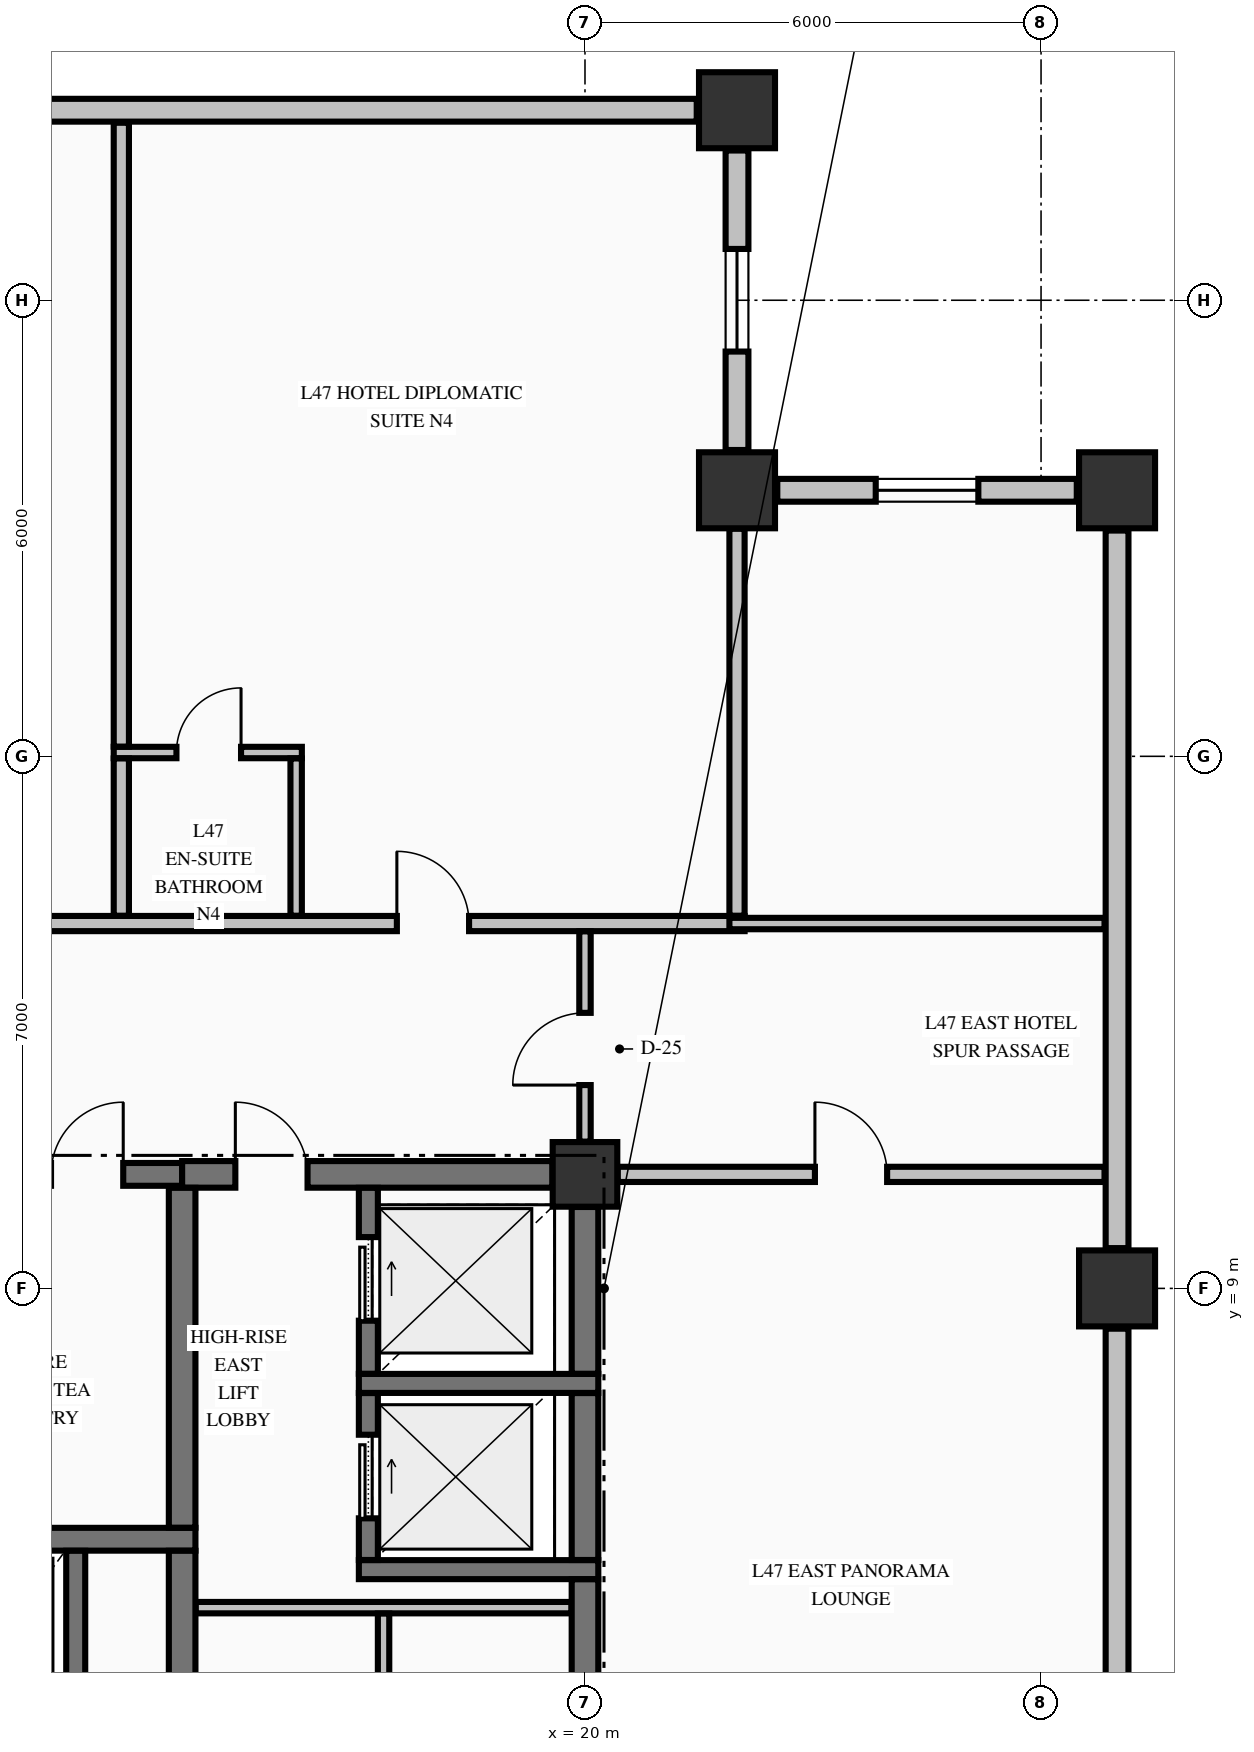
"""IFC4 building model, lengths in metres.
Left out: names, types, materials, properties, quantities, classifications, styles, units other than length and angle.
Written with IfcOpenShell. Run it as: python <this file> out.ifc"""

import sys

from ifc_helpers import new_model, si_unit, direction, frame, frame_2d, origin, origin_2d, place, context, subcontext, project, spatial, rectangle, extrude, element, fill, save


model = new_model("IFC4")
c1 = context("Model", 3, precision=1e-05, world=origin(), true_north=direction((0.0, 1.0)))
c2 = subcontext(c1, "Body", "Model", "MODEL_VIEW")
j1 = project(units=[si_unit("LENGTHUNIT", "METRE"), si_unit("PLANEANGLEUNIT", "RADIAN")], contexts=[c1])
p1 = place(None, origin())
s1 = spatial("IfcSite", under=j1, at=p1, CompositionType="ELEMENT")
p2 = place(p1, origin())
s2 = spatial("IfcBuilding", under=s1, at=p2, CompositionType="ELEMENT")
p3 = place(p2, frame((0.0, 0.0, 183.06)))
s3 = spatial("IfcBuildingStorey", under=s2, at=p3, CompositionType="ELEMENT", Elevation=183.06)
for number, where, z_axis, x_axis in (
    (1, (22.0, 24.5, -0.25), (0.0, 0.0, 1.0), (1.0, 0.0, 0.0)),
    (2, (27.0, 9.0, -0.25), (0.0, 0.0, 1.0), (1.0, 0.0, 0.0)),
    (3, (27.0, 19.5, -0.25), (0.0, 0.0, 1.0), (1.0, 0.0, 0.0)),
    (4, (22.0, 19.5, -0.25), (0.0, 0.0, 1.0), (1.0, 0.0, 0.0)),
):
    element("IfcColumn", number, at=place(p3, frame(where, z_axis=z_axis, x_axis=x_axis)), inside=s3, PredefinedType="COLUMN", context=c2, shape_type="SweptSolid", body=[
        extrude(rectangle(XDim=1.0, YDim=1.0, at=origin_2d()), origin(), (0.0, 0.0, 1.0), 3.225),
    ])
p4 = place(p3, frame((20.0, 10.5, -0.25), z_axis=(0.0, 0.0, 1.0), x_axis=(1.0, 0.0, 0.0)))
e5 = element("IfcColumn", 5, at=p4, inside=s3, PredefinedType="COLUMN", context=c2, shape_type="SweptSolid", body=[
    extrude(rectangle(XDim=0.85, YDim=0.85, at=origin_2d()), origin(), (0.0, 0.0, 1.0), 3.225),
])
p5 = place(p3, frame((26.47, 19.5, 0.0), z_axis=(0.0, 0.0, 1.0), x_axis=(-1.0, 0.0, 0.0)))
e6 = element("IfcWall", 6, at=p5, inside=s3, PredefinedType="STANDARD", context=c2, shape_type="SweptSolid", body=[
    extrude(rectangle(XDim=3.94, YDim=0.3, at=frame_2d((1.97, 0.0))), origin(), (0.0, 0.0, 1.0), 2.367),
])
p6 = place(p5, frame((1.295, 0.0, 0.68)))
e7 = element("IfcOpeningElement", 7, at=p6, cuts=e6, PredefinedType="OPENING", context=c2, shape_type="SweptSolid", body=[
    extrude(rectangle(XDim=1.35, YDim=1.42, at=frame_2d((0.675, 0.71))), frame((0.0, 0.16, 0.0), z_axis=(0.0, -1.0, 0.0), x_axis=(1.0, 0.0, 0.0)), (0.0, 0.0, 1.0), 0.32),
])
p7 = place(p3, frame((22.0, 20.03, 0.0), z_axis=(0.0, 0.0, 1.0), x_axis=(0.0, 1.0, 0.0)))
e8 = element("IfcWall", 8, at=p7, inside=s3, PredefinedType="STANDARD", context=c2, shape_type="SweptSolid", body=[
    extrude(rectangle(XDim=3.94, YDim=0.3, at=frame_2d((1.97, 0.0))), origin(), (0.0, 0.0, 1.0), 2.367),
])
p8 = place(p7, frame((1.295, 0.0, 0.68)))
e9 = element("IfcOpeningElement", 9, at=p8, cuts=e8, PredefinedType="OPENING", context=c2, shape_type="SweptSolid", body=[
    extrude(rectangle(XDim=1.35, YDim=1.42, at=frame_2d((0.675, 0.71))), frame((0.0, 0.16, 0.0), z_axis=(0.0, -1.0, 0.0), x_axis=(1.0, 0.0, 0.0)), (0.0, 0.0, 1.0), 0.32),
])
p9 = place(p3, frame((21.47, 24.5, 0.0), z_axis=(0.0, 0.0, 1.0), x_axis=(-1.0, 0.0, 0.0)))
e10 = element("IfcWall", 10, at=p9, inside=s3, PredefinedType="STANDARD", context=c2, shape_type="SweptSolid", body=[
    extrude(rectangle(XDim=9.94, YDim=0.3, at=frame_2d((4.97, 0.0))), origin(), (0.0, 0.0, 1.0), 2.367),
])
p10 = place(p3, frame((27.0, 0.53, 0.0), z_axis=(0.0, 0.0, 1.0), x_axis=(0.0, 1.0, 0.0)))
e11 = element("IfcWall", 11, at=p10, inside=s3, PredefinedType="STANDARD", context=c2, shape_type="SweptSolid", body=[
    extrude(rectangle(XDim=7.94, YDim=0.3, at=frame_2d((3.97, 0.0))), origin(), (0.0, 0.0, 1.0), 2.367),
])
p11 = place(p3, frame((27.0, 9.53, 0.0), z_axis=(0.0, 0.0, 1.0), x_axis=(0.0, 1.0, 0.0)))
e12 = element("IfcWall", 12, at=p11, inside=s3, PredefinedType="STANDARD", context=c2, shape_type="SweptSolid", body=[
    extrude(rectangle(XDim=9.44, YDim=0.3, at=frame_2d((4.72, 0.0))), origin(), (0.0, 0.0, 1.0), 2.367),
])
p12 = place(p3, frame((17.025, 5.3, 0.0), z_axis=(0.0, 0.0, 1.0), x_axis=(1.0, 0.0, 0.0)))
e13 = element("IfcWall", 13, at=p12, inside=s3, PredefinedType="SOLIDWALL", context=c2, shape_type="SweptSolid", body=[
    extrude(rectangle(XDim=3.15, YDim=0.25, at=frame_2d((1.575, 0.0))), origin(), (0.0, 0.0, 1.0), 2.975),
])
p13 = place(p3, frame((10.85, 5.7, 0.0), z_axis=(0.0, 0.0, 1.0), x_axis=(1.0, 0.0, 0.0)))
e14 = element("IfcWall", 14, at=p13, inside=s3, PredefinedType="SHEAR", context=c2, shape_type="SweptSolid", body=[
    extrude(rectangle(XDim=4.025, YDim=0.3, at=frame_2d((2.012, 0.0))), origin(), (0.0, 0.0, 1.0), 2.975),
])
p14 = place(p3, frame((17.025, 7.75, 0.0), z_axis=(0.0, 0.0, 1.0), x_axis=(1.0, 0.0, 0.0)))
e15 = element("IfcWall", 15, at=p14, inside=s3, PredefinedType="SOLIDWALL", context=c2, shape_type="SweptSolid", body=[
    extrude(rectangle(XDim=3.15, YDim=0.25, at=frame_2d((1.575, 0.0))), origin(), (0.0, 0.0, 1.0), 2.975),
])
p15 = place(p3, frame((11.429, 10.5, 0.0), z_axis=(0.0, 0.0, 1.0), x_axis=(1.0, 0.0, 0.0)))
e16 = element("IfcWall", 16, at=p15, inside=s3, PredefinedType="SHEAR", context=c2, shape_type="SweptSolid", body=[
    extrude(rectangle(XDim=3.271, YDim=0.3, at=frame_2d((1.635, 0.0))), origin(), (0.0, 0.0, 1.0), 2.975),
])
p16 = place(p15, frame((1.546, 0.0, 0.0)))
e17 = element("IfcOpeningElement", 17, at=p16, cuts=e16, PredefinedType="OPENING", context=c2, shape_type="SweptSolid", body=[
    extrude(rectangle(XDim=0.95, YDim=2.02, at=frame_2d((0.475, 1.01))), frame((0.0, 0.16, 0.0), z_axis=(0.0, -1.0, 0.0), x_axis=(1.0, 0.0, 0.0)), (0.0, 0.0, 1.0), 0.32),
])
p17 = place(p3, frame((14.7, 10.5, 0.0), z_axis=(0.0, 0.0, 1.0), x_axis=(1.0, 0.0, 0.0)))
e18 = element("IfcWall", 18, at=p17, inside=s3, PredefinedType="SHEAR", context=c2, shape_type="SweptSolid", body=[
    extrude(rectangle(XDim=4.871, YDim=0.35, at=frame_2d((2.436, 0.0))), origin(), (0.0, 0.0, 1.0), 2.975),
])
p18 = place(p17, frame((0.7, 0.0, 0.0)))
e19 = element("IfcOpeningElement", 19, at=p18, cuts=e18, PredefinedType="OPENING", context=c2, shape_type="SweptSolid", body=[
    extrude(rectangle(XDim=0.95, YDim=2.02, at=frame_2d((0.475, 1.01))), frame((0.0, 0.185, 0.0), z_axis=(0.0, -1.0, 0.0), x_axis=(1.0, 0.0, 0.0)), (0.0, 0.0, 1.0), 0.37),
])
p19 = place(p3, frame((14.878, 4.8, 0.0), z_axis=(0.0, 0.0, 1.0), x_axis=(1.0, 0.0, 0.0)))
e20 = element("IfcWall", 20, at=p19, inside=s3, PredefinedType="PARTITIONING", context=c2, shape_type="SweptSolid", body=[
    extrude(rectangle(XDim=4.944, YDim=0.15, at=frame_2d((2.472, 0.0))), origin(), (0.0, 0.0, 1.0), 2.975),
])
p20 = place(p3, frame((20.431, 10.5, 0.0), z_axis=(0.0, 0.0, 1.0), x_axis=(1.0, 0.0, 0.0)))
e21 = element("IfcWall", 21, at=p20, inside=s3, PredefinedType="PARTITIONING", context=c2, shape_type="SweptSolid", body=[
    extrude(rectangle(XDim=6.404, YDim=0.2, at=frame_2d((3.202, 0.0))), origin(), (0.0, 0.0, 1.0), 2.975),
])
p21 = place(p20, frame((2.594, 0.0, 0.0)))
e22 = element("IfcOpeningElement", 22, at=p21, cuts=e21, PredefinedType="OPENING", context=c2, shape_type="SweptSolid", body=[
    extrude(rectangle(XDim=0.95, YDim=2.15, at=frame_2d((0.475, 1.075))), frame((0.0, 0.11, 0.0), z_axis=(0.0, -1.0, 0.0), x_axis=(1.0, 0.0, 0.0)), (0.0, 0.0, 1.0), 0.22),
])
p22 = place(p3, frame((-17.1, 13.8, 0.0), z_axis=(0.0, 0.0, 1.0), x_axis=(1.0, 0.0, 0.0)))
e23 = element("IfcWall", 23, at=p22, inside=s3, PredefinedType="PARTITIONING", context=c2, shape_type="SweptSolid", body=[
    extrude(rectangle(XDim=39.2, YDim=0.2, at=frame_2d((19.6, 0.0))), origin(), (0.0, 0.0, 1.0), 2.975),
])
p23 = place(p22, frame((7.475, 0.0, 0.0)))
e24 = element("IfcOpeningElement", 24, at=p23, cuts=e23, PredefinedType="OPENING", context=c2, shape_type="SweptSolid", body=[
    extrude(rectangle(XDim=0.95, YDim=2.15, at=frame_2d((0.475, 1.075))), frame((0.0, 0.11, 0.0), z_axis=(0.0, -1.0, 0.0), x_axis=(1.0, 0.0, 0.0)), (0.0, 0.0, 1.0), 0.22),
])
p24 = place(p22, frame((14.625, 0.0, 0.0)))
e25 = element("IfcOpeningElement", 25, at=p24, cuts=e23, PredefinedType="OPENING", context=c2, shape_type="SweptSolid", body=[
    extrude(rectangle(XDim=1.05, YDim=2.15, at=frame_2d((0.525, 1.075))), frame((0.0, 0.11, 0.0), z_axis=(0.0, -1.0, 0.0), x_axis=(1.0, 0.0, 0.0)), (0.0, 0.0, 1.0), 0.22),
])
p25 = place(p22, frame((28.875, 0.0, 0.0)))
e26 = element("IfcOpeningElement", 26, at=p25, cuts=e23, PredefinedType="OPENING", context=c2, shape_type="SweptSolid", body=[
    extrude(rectangle(XDim=0.95, YDim=2.15, at=frame_2d((0.475, 1.075))), frame((0.0, 0.11, 0.0), z_axis=(0.0, -1.0, 0.0), x_axis=(1.0, 0.0, 0.0)), (0.0, 0.0, 1.0), 0.22),
])
p26 = place(p22, frame((34.625, 0.0, 0.0)))
e27 = element("IfcOpeningElement", 27, at=p26, cuts=e23, PredefinedType="OPENING", context=c2, shape_type="SweptSolid", body=[
    extrude(rectangle(XDim=0.95, YDim=2.15, at=frame_2d((0.475, 1.075))), frame((0.0, 0.11, 0.0), z_axis=(0.0, -1.0, 0.0), x_axis=(1.0, 0.0, 0.0)), (0.0, 0.0, 1.0), 0.22),
])
p27 = place(p3, frame((21.9, 13.8, 0.0), z_axis=(0.0, 0.0, 1.0), x_axis=(1.0, 0.0, 0.0)))
e28 = element("IfcWall", 28, at=p27, inside=s3, PredefinedType="PARTITIONING", context=c2, shape_type="SweptSolid", body=[
    extrude(rectangle(XDim=4.935, YDim=0.15, at=frame_2d((2.468, 0.0))), origin(), (0.0, 0.0, 1.0), 2.975),
])
p28 = place(p3, frame((13.8, 16.05, 0.0), z_axis=(0.0, 0.0, 1.0), x_axis=(1.0, 0.0, 0.0)))
e29 = element("IfcWall", 29, at=p28, inside=s3, PredefinedType="PARTITIONING", context=c2, shape_type="SweptSolid", body=[
    extrude(rectangle(XDim=2.475, YDim=0.15, at=frame_2d((1.237, 0.0))), origin(), (0.0, 0.0, 1.0), 2.975),
])
p29 = place(p28, frame((0.825, 0.0, 0.0)))
e30 = element("IfcOpeningElement", 30, at=p29, cuts=e29, PredefinedType="OPENING", context=c2, shape_type="SweptSolid", body=[
    extrude(rectangle(XDim=0.85, YDim=2.1, at=frame_2d((0.425, 1.05))), frame((0.0, 0.085, 0.0), z_axis=(0.0, -1.0, 0.0), x_axis=(1.0, 0.0, 0.0)), (0.0, 0.0, 1.0), 0.17),
])
p30 = place(p3, frame((13.3, 3.052, 0.0), z_axis=(0.0, 0.0, 1.0), x_axis=(0.0, 1.0, 0.0)))
e31 = element("IfcWall", 31, at=p30, inside=s3, PredefinedType="SOLIDWALL", context=c2, shape_type="SweptSolid", body=[
    extrude(rectangle(XDim=2.496, YDim=0.25, at=frame_2d((1.248, 0.0))), origin(), (0.0, 0.0, 1.0), 2.975),
])
p31 = place(p3, frame((14.7, 3.052, 0.0), z_axis=(0.0, 0.0, 1.0), x_axis=(0.0, 1.0, 0.0)))
e32 = element("IfcWall", 32, at=p31, inside=s3, PredefinedType="SHEAR", context=c2, shape_type="SweptSolid", body=[
    extrude(rectangle(XDim=2.496, YDim=0.35, at=frame_2d((1.248, 0.0))), origin(), (0.0, 0.0, 1.0), 2.975),
])
p32 = place(p3, frame((14.7, 5.852, 0.0), z_axis=(0.0, 0.0, 1.0), x_axis=(0.0, 1.0, 0.0)))
e33 = element("IfcWall", 33, at=p32, inside=s3, PredefinedType="SHEAR", context=c2, shape_type="SweptSolid", body=[
    extrude(rectangle(XDim=4.471, YDim=0.35, at=frame_2d((2.235, 0.0))), origin(), (0.0, 0.0, 1.0), 2.975),
])
p33 = place(p3, frame((17.15, 5.427, 0.0), z_axis=(0.0, 0.0, 1.0), x_axis=(0.0, 1.0, 0.0)))
e34 = element("IfcWall", 34, at=p33, inside=s3, PredefinedType="SOLIDWALL", context=c2, shape_type="SweptSolid", body=[
    extrude(rectangle(XDim=2.196, YDim=0.25, at=frame_2d((1.098, 0.0))), origin(), (0.0, 0.0, 1.0), 2.975),
])
p34 = place(p33, frame((0.548, 0.0, 0.0)))
e35 = element("IfcOpeningElement", 35, at=p34, cuts=e34, PredefinedType="OPENING", context=c2, shape_type="SweptSolid", body=[
    extrude(rectangle(XDim=1.1, YDim=2.2, at=frame_2d((0.55, 1.1))), frame((0.0, 0.135, 0.0), z_axis=(0.0, -1.0, 0.0), x_axis=(1.0, 0.0, 0.0)), (0.0, 0.0, 1.0), 0.27),
])
p35 = place(p3, frame((17.15, 7.877, 0.0), z_axis=(0.0, 0.0, 1.0), x_axis=(0.0, 1.0, 0.0)))
e36 = element("IfcWall", 36, at=p35, inside=s3, PredefinedType="SOLIDWALL", context=c2, shape_type="SweptSolid", body=[
    extrude(rectangle(XDim=2.446, YDim=0.25, at=frame_2d((1.223, 0.0))), origin(), (0.0, 0.0, 1.0), 2.975),
])
p36 = place(p35, frame((0.698, 0.0, 0.0)))
e37 = element("IfcOpeningElement", 37, at=p36, cuts=e36, PredefinedType="OPENING", context=c2, shape_type="SweptSolid", body=[
    extrude(rectangle(XDim=1.1, YDim=2.2, at=frame_2d((0.55, 1.1))), frame((0.0, 0.135, 0.0), z_axis=(0.0, -1.0, 0.0), x_axis=(1.0, 0.0, 0.0)), (0.0, 0.0, 1.0), 0.27),
])
p37 = place(p3, frame((20.0, 0.429, 0.0), z_axis=(0.0, 0.0, 1.0), x_axis=(0.0, 1.0, 0.0)))
e38 = element("IfcWall", 38, at=p37, inside=s3, PredefinedType="SHEAR", context=c2, shape_type="SweptSolid", body=[
    extrude(rectangle(XDim=4.744, YDim=0.35, at=frame_2d((2.372, 0.0))), origin(), (0.0, 0.0, 1.0), 2.975),
])
p38 = place(p3, frame((20.0, 5.427, 0.0), z_axis=(0.0, 0.0, 1.0), x_axis=(0.0, 1.0, 0.0)))
e39 = element("IfcWall", 39, at=p38, inside=s3, PredefinedType="SHEAR", context=c2, shape_type="SweptSolid", body=[
    extrude(rectangle(XDim=2.196, YDim=0.35, at=frame_2d((1.098, 0.0))), origin(), (0.0, 0.0, 1.0), 2.975),
])
p39 = place(p3, frame((20.0, 7.877, 0.0), z_axis=(0.0, 0.0, 1.0), x_axis=(0.0, 1.0, 0.0)))
e40 = element("IfcWall", 40, at=p39, inside=s3, PredefinedType="SHEAR", context=c2, shape_type="SweptSolid", body=[
    extrude(rectangle(XDim=2.194, YDim=0.35, at=frame_2d((1.097, 0.0))), origin(), (0.0, 0.0, 1.0), 2.975),
])
p40 = place(p3, frame((13.9, 13.903, 0.0), z_axis=(0.0, 0.0, 1.0), x_axis=(0.0, 1.0, 0.0)))
e41 = element("IfcWall", 41, at=p40, inside=s3, PredefinedType="PARTITIONING", context=c2, shape_type="SweptSolid", body=[
    extrude(rectangle(XDim=2.069, YDim=0.2, at=frame_2d((1.034, 0.0))), origin(), (0.0, 0.0, 1.0), 2.975),
])
p41 = place(p3, frame((13.9, 16.128, 0.0), z_axis=(0.0, 0.0, 1.0), x_axis=(0.0, 1.0, 0.0)))
e42 = element("IfcWall", 42, at=p41, inside=s3, PredefinedType="PARTITIONING", context=c2, shape_type="SweptSolid", body=[
    extrude(rectangle(XDim=8.207, YDim=0.2, at=frame_2d((4.104, 0.0))), origin(), (0.0, 0.0, 1.0), 2.975),
])
p42 = place(p3, frame((16.2, 13.903, 0.0), z_axis=(0.0, 0.0, 1.0), x_axis=(0.0, 1.0, 0.0)))
e43 = element("IfcWall", 43, at=p42, inside=s3, PredefinedType="PARTITIONING", context=c2, shape_type="SweptSolid", body=[
    extrude(rectangle(XDim=2.069, YDim=0.15, at=frame_2d((1.034, 0.0))), origin(), (0.0, 0.0, 1.0), 2.975),
])
p43 = place(p3, frame((17.35, -9.772, 0.0), z_axis=(0.0, 0.0, 1.0), x_axis=(0.0, 1.0, 0.0)))
e44 = element("IfcWall", 44, at=p43, inside=s3, PredefinedType="PARTITIONING", context=c2, shape_type="SweptSolid", body=[
    extrude(rectangle(XDim=14.494, YDim=0.15, at=frame_2d((7.247, 0.0))), origin(), (0.0, 0.0, 1.0), 2.975),
])
p44 = place(p3, frame((20.0, 10.931, 0.0), z_axis=(0.0, 0.0, 1.0), x_axis=(0.0, 1.0, 0.0)))
e45 = element("IfcWall", 45, at=p44, inside=s3, PredefinedType="PARTITIONING", context=c2, shape_type="SweptSolid", body=[
    extrude(rectangle(XDim=2.766, YDim=0.15, at=frame_2d((1.383, 0.0))), origin(), (0.0, 0.0, 1.0), 2.167),
])
p45 = place(p44, frame((0.744, 0.0, 0.0)))
e46 = element("IfcOpeningElement", 46, at=p45, cuts=e45, PredefinedType="OPENING", context=c2, shape_type="SweptSolid", body=[
    extrude(rectangle(XDim=0.95, YDim=2.02, at=frame_2d((0.475, 1.01))), frame((0.0, 0.085, 0.0), z_axis=(0.0, -1.0, 0.0), x_axis=(1.0, 0.0, 0.0)), (0.0, 0.0, 1.0), 0.17),
])
p46 = place(p3, frame((22.0, 13.903, 0.0), z_axis=(0.0, 0.0, 1.0), x_axis=(0.0, 1.0, 0.0)))
e47 = element("IfcWall", 47, at=p46, inside=s3, PredefinedType="PARTITIONING", context=c2, shape_type="SweptSolid", body=[
    extrude(rectangle(XDim=5.091, YDim=0.2, at=frame_2d((2.545, 0.0))), origin(), (0.0, 0.0, 1.0), 2.975),
])
p47 = place(p6, origin())
e48 = element("IfcWindow", 48, at=p47, inside=s3, PartitioningType="SINGLE_PANEL", PredefinedType="WINDOW", context=c2, shape_type="SweptSolid", body=[
    extrude(rectangle(XDim=1.35, YDim=1.42, at=frame_2d((0.675, 0.71))), frame((0.0, 0.03, 0.0), z_axis=(0.0, -1.0, 0.0), x_axis=(1.0, 0.0, 0.0)), (0.0, 0.0, 1.0), 0.06),
])
fill(e7, e48)
p48 = place(p8, origin())
e49 = element("IfcWindow", 49, at=p48, inside=s3, PartitioningType="SINGLE_PANEL", PredefinedType="WINDOW", context=c2, shape_type="SweptSolid", body=[
    extrude(rectangle(XDim=1.35, YDim=1.42, at=frame_2d((0.675, 0.71))), frame((0.0, 0.03, 0.0), z_axis=(0.0, -1.0, 0.0), x_axis=(1.0, 0.0, 0.0)), (0.0, 0.0, 1.0), 0.06),
])
fill(e9, e49)
p49 = place(p16, origin())
e50 = element("IfcDoor", 50, at=p49, inside=s3, OperationType="SINGLE_SWING_RIGHT", PredefinedType="DOOR", context=c2, shape_type="SweptSolid", body=[
    extrude(rectangle(XDim=0.95, YDim=2.02, at=frame_2d((0.475, 1.01))), frame((0.0, 0.025, 0.0), z_axis=(0.0, -1.0, 0.0), x_axis=(1.0, 0.0, 0.0)), (0.0, 0.0, 1.0), 0.05),
])
fill(e17, e50)
p50 = place(p34, origin())
e51 = element("IfcDoor", 51, at=p50, inside=s3, OperationType="SLIDING_TO_RIGHT", PredefinedType="DOOR", context=c2, shape_type="SweptSolid", body=[
    extrude(rectangle(XDim=1.1, YDim=2.2, at=frame_2d((0.55, 1.1))), frame((0.0, 0.025, 0.0), z_axis=(0.0, -1.0, 0.0), x_axis=(1.0, 0.0, 0.0)), (0.0, 0.0, 1.0), 0.05),
])
fill(e35, e51)
p51 = place(p36, origin())
e52 = element("IfcDoor", 52, at=p51, inside=s3, OperationType="SLIDING_TO_RIGHT", PredefinedType="DOOR", context=c2, shape_type="SweptSolid", body=[
    extrude(rectangle(XDim=1.1, YDim=2.2, at=frame_2d((0.55, 1.1))), frame((0.0, 0.025, 0.0), z_axis=(0.0, -1.0, 0.0), x_axis=(1.0, 0.0, 0.0)), (0.0, 0.0, 1.0), 0.05),
])
fill(e37, e52)
p52 = place(p18, origin())
e53 = element("IfcDoor", 53, at=p52, inside=s3, OperationType="SINGLE_SWING_LEFT", PredefinedType="DOOR", context=c2, shape_type="SweptSolid", body=[
    extrude(rectangle(XDim=0.95, YDim=2.02, at=frame_2d((0.475, 1.01))), frame((0.0, 0.025, 0.0), z_axis=(0.0, -1.0, 0.0), x_axis=(1.0, 0.0, 0.0)), (0.0, 0.0, 1.0), 0.05),
])
fill(e19, e53)
p53 = place(p26, origin())
e54 = element("IfcDoor", 54, at=p53, inside=s3, OperationType="SINGLE_SWING_LEFT", PredefinedType="DOOR", context=c2, shape_type="SweptSolid", body=[
    extrude(rectangle(XDim=0.95, YDim=2.15, at=frame_2d((0.475, 1.075))), frame((0.0, 0.025, 0.0), z_axis=(0.0, -1.0, 0.0), x_axis=(1.0, 0.0, 0.0)), (0.0, 0.0, 1.0), 0.05),
])
fill(e27, e54)
p54 = place(p29, origin())
e55 = element("IfcDoor", 55, at=p54, inside=s3, OperationType="SINGLE_SWING_RIGHT", PredefinedType="DOOR", context=c2, shape_type="SweptSolid", body=[
    extrude(rectangle(XDim=0.85, YDim=2.1, at=frame_2d((0.425, 1.05))), frame((0.0, 0.025, 0.0), z_axis=(0.0, -1.0, 0.0), x_axis=(1.0, 0.0, 0.0)), (0.0, 0.0, 1.0), 0.05),
])
fill(e30, e55)
p55 = place(p45, origin())
e56 = element("IfcDoor", 56, at=p55, inside=s3, OperationType="SINGLE_SWING_LEFT", PredefinedType="DOOR", context=c2, shape_type="SweptSolid", body=[
    extrude(rectangle(XDim=0.95, YDim=2.02, at=frame_2d((0.475, 1.01))), frame((0.0, 0.025, 0.0), z_axis=(0.0, -1.0, 0.0), x_axis=(1.0, 0.0, 0.0)), (0.0, 0.0, 1.0), 0.05),
])
fill(e46, e56)
p56 = place(p21, origin())
e57 = element("IfcDoor", 57, at=p56, inside=s3, OperationType="SINGLE_SWING_LEFT", PredefinedType="DOOR", context=c2, shape_type="SweptSolid", body=[
    extrude(rectangle(XDim=0.95, YDim=2.15, at=frame_2d((0.475, 1.075))), frame((0.0, 0.025, 0.0), z_axis=(0.0, -1.0, 0.0), x_axis=(1.0, 0.0, 0.0)), (0.0, 0.0, 1.0), 0.05),
])
fill(e22, e57)
save(model, sys.argv[1])
